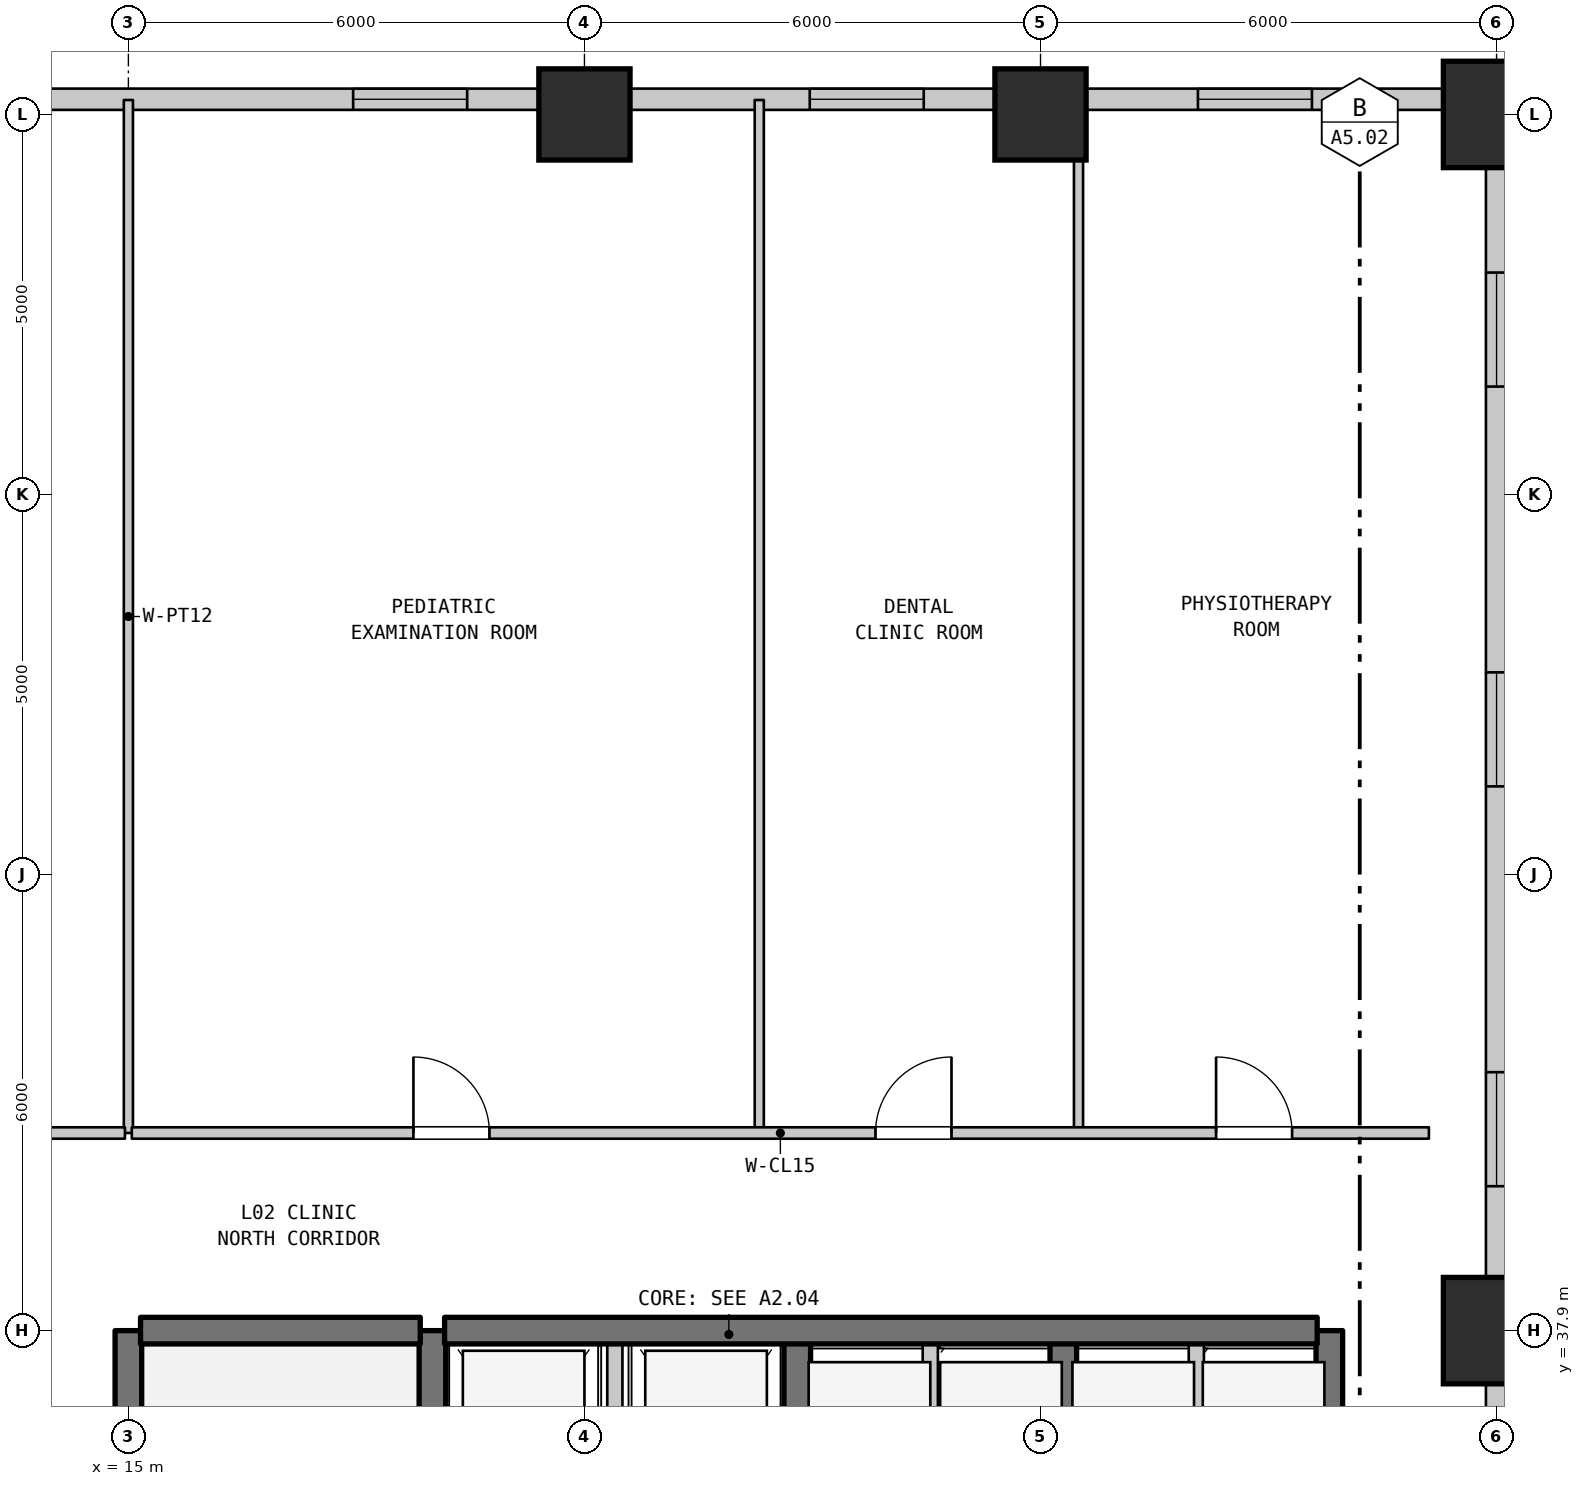
"""IFC4 building model, lengths in metres.
Left out: names, types, materials, properties, quantities, classifications, styles, units other than length and angle.
Written with IfcOpenShell. Run it as: python <this file> out.ifc"""

import sys

from ifc_helpers import new_model, si_unit, direction, frame, frame_2d, origin, origin_2d, place, context, subcontext, project, spatial, rectangle, extrude, element, fill, save


model = new_model("IFC4")
c1 = context("Model", 3, precision=1e-05, world=origin(), true_north=direction((0.0, 1.0)))
c2 = subcontext(c1, "Body", "Model", "MODEL_VIEW")
j1 = project(units=[si_unit("LENGTHUNIT", "METRE"), si_unit("PLANEANGLEUNIT", "RADIAN")], contexts=[c1])
p1 = place(None, origin())
s1 = spatial("IfcSite", under=j1, at=p1, CompositionType="ELEMENT")
p2 = place(p1, origin())
s2 = spatial("IfcBuilding", under=s1, at=p2, CompositionType="ELEMENT")
p3 = place(p2, frame((0.0, 0.0, 13.0)))
s3 = spatial("IfcBuildingStorey", under=s2, at=p3, CompositionType="ELEMENT", Elevation=13.0)
for number, where, z_axis, x_axis in (
    (1, (21.0, 53.9, 0.0), (0.0, 0.0, 1.0), (1.0, 0.0, 0.0)),
    (2, (27.0, 53.9, 0.0), (0.0, 0.0, 1.0), (1.0, 0.0, 0.0)),
):
    element("IfcColumn", number, at=place(p3, frame(where, z_axis=z_axis, x_axis=x_axis)), inside=s3, PredefinedType="PILASTER", context=c2, shape_type="SweptSolid", body=[
        extrude(rectangle(XDim=1.2, YDim=1.2, at=origin_2d()), origin(), (0.0, 0.0, 1.0), 6.0),
    ])
for number, where, z_axis, x_axis in (
    (3, (33.0, 37.9, 0.0), (0.0, 0.0, 1.0), (1.0, 0.0, 0.0)),
    (4, (33.0, 53.9, 0.0), (0.0, 0.0, 1.0), (1.0, 0.0, 0.0)),
):
    element("IfcColumn", number, at=place(p3, frame(where, z_axis=z_axis, x_axis=x_axis)), inside=s3, PredefinedType="PILASTER", context=c2, shape_type="SweptSolid", body=[
        extrude(rectangle(XDim=1.4, YDim=1.4, at=origin_2d()), origin(), (0.0, 0.0, 1.0), 6.0),
    ])
p4 = place(p3, frame((4.414, 54.1, 0.0), z_axis=(0.0, 0.0, 1.0), x_axis=(1.0, 0.0, 0.0)))
e5 = element("IfcWall", 5, at=p4, inside=s3, PredefinedType="STANDARD", context=c2, shape_type="SweptSolid", body=[
    extrude(rectangle(XDim=28.586, YDim=0.28, at=frame_2d((14.293, 0.0))), origin(), (0.0, 0.0, 1.0), 5.58),
])
p5 = place(p4, frame((2.429, 0.0, 0.95)))
e6 = element("IfcOpeningElement", 6, at=p5, cuts=e5, PredefinedType="OPENING", context=c2, shape_type="SweptSolid", body=[
    extrude(rectangle(XDim=1.5, YDim=1.8, at=frame_2d((0.75, 0.9))), frame((0.0, 0.15, 0.0), z_axis=(0.0, -1.0, 0.0), x_axis=(1.0, 0.0, 0.0)), (0.0, 0.0, 1.0), 0.3),
])
p6 = place(p4, frame((7.986, 0.0, 0.95)))
e7 = element("IfcOpeningElement", 7, at=p6, cuts=e5, PredefinedType="OPENING", context=c2, shape_type="SweptSolid", body=[
    extrude(rectangle(XDim=1.5, YDim=1.8, at=frame_2d((0.75, 0.9))), frame((0.0, 0.15, 0.0), z_axis=(0.0, -1.0, 0.0), x_axis=(1.0, 0.0, 0.0)), (0.0, 0.0, 1.0), 0.3),
])
p7 = place(p4, frame((13.543, 0.0, 0.95)))
e8 = element("IfcOpeningElement", 8, at=p7, cuts=e5, PredefinedType="OPENING", context=c2, shape_type="SweptSolid", body=[
    extrude(rectangle(XDim=1.5, YDim=1.8, at=frame_2d((0.75, 0.9))), frame((0.0, 0.15, 0.0), z_axis=(0.0, -1.0, 0.0), x_axis=(1.0, 0.0, 0.0)), (0.0, 0.0, 1.0), 0.3),
])
p8 = place(p4, frame((19.55, 0.0, 0.95)))
e9 = element("IfcOpeningElement", 9, at=p8, cuts=e5, PredefinedType="OPENING", context=c2, shape_type="SweptSolid", body=[
    extrude(rectangle(XDim=1.5, YDim=1.8, at=frame_2d((0.75, 0.9))), frame((0.0, 0.15, 0.0), z_axis=(0.0, -1.0, 0.0), x_axis=(1.0, 0.0, 0.0)), (0.0, 0.0, 1.0), 0.3),
])
p9 = place(p4, frame((24.657, 0.0, 0.95)))
e10 = element("IfcOpeningElement", 10, at=p9, cuts=e5, PredefinedType="OPENING", context=c2, shape_type="SweptSolid", body=[
    extrude(rectangle(XDim=1.5, YDim=1.8, at=frame_2d((0.75, 0.9))), frame((0.0, 0.15, 0.0), z_axis=(0.0, -1.0, 0.0), x_axis=(1.0, 0.0, 0.0)), (0.0, 0.0, 1.0), 0.3),
])
p10 = place(p3, frame((33.0, 54.1, 0.0), z_axis=(0.0, 0.0, 1.0), x_axis=(0.0, -1.0, 0.0)))
e11 = element("IfcWall", 11, at=p10, inside=s3, PredefinedType="STANDARD", context=c2, shape_type="SweptSolid", body=[
    extrude(rectangle(XDim=16.2, YDim=0.28, at=frame_2d((8.1, 0.0))), origin(), (0.0, 0.0, 1.0), 4.98),
])
p11 = place(p10, frame((2.28, 0.0, 0.95)))
e12 = element("IfcOpeningElement", 12, at=p11, cuts=e11, PredefinedType="OPENING", context=c2, shape_type="SweptSolid", body=[
    extrude(rectangle(XDim=1.5, YDim=1.8, at=frame_2d((0.75, 0.9))), frame((0.0, 0.15, 0.0), z_axis=(0.0, -1.0, 0.0), x_axis=(1.0, 0.0, 0.0)), (0.0, 0.0, 1.0), 0.3),
])
p12 = place(p10, frame((7.54, 0.0, 0.95)))
e13 = element("IfcOpeningElement", 13, at=p12, cuts=e11, PredefinedType="OPENING", context=c2, shape_type="SweptSolid", body=[
    extrude(rectangle(XDim=1.5, YDim=1.8, at=frame_2d((0.75, 0.9))), frame((0.0, 0.15, 0.0), z_axis=(0.0, -1.0, 0.0), x_axis=(1.0, 0.0, 0.0)), (0.0, 0.0, 1.0), 0.3),
])
p13 = place(p10, frame((12.8, 0.0, 0.95)))
e14 = element("IfcOpeningElement", 14, at=p13, cuts=e11, PredefinedType="OPENING", context=c2, shape_type="SweptSolid", body=[
    extrude(rectangle(XDim=1.5, YDim=1.8, at=frame_2d((0.75, 0.9))), frame((0.0, 0.15, 0.0), z_axis=(0.0, -1.0, 0.0), x_axis=(1.0, 0.0, 0.0)), (0.0, 0.0, 1.0), 0.3),
])
p14 = place(p3, frame((15.0, 31.1, 0.0), z_axis=(0.0, 0.0, 1.0), x_axis=(0.0, 1.0, 0.0)))
e15 = element("IfcWall", 15, at=p14, inside=s3, PredefinedType="SHEAR", context=c2, shape_type="SweptSolid", body=[
    extrude(rectangle(XDim=6.8, YDim=0.35, at=frame_2d((3.4, 0.0))), origin(), (0.0, 0.0, 1.0), 5.58),
])
p15 = place(p3, frame((15.0, 40.5, 0.0), z_axis=(0.0, 0.0, 1.0), x_axis=(0.0, 1.0, 0.0)))
e16 = element("IfcWall", 16, at=p15, inside=s3, PredefinedType="PARTITIONING", context=c2, shape_type="SweptSolid", body=[
    extrude(rectangle(XDim=13.59, YDim=0.12, at=frame_2d((6.795, 0.0))), origin(), (0.0, 0.0, 1.0), 5.58),
])
p16 = place(p3, frame((19.0, 35.0, 0.0), z_axis=(0.0, 0.0, 1.0), x_axis=(0.0, 1.0, 0.0)))
e17 = element("IfcWall", 17, at=p16, inside=s3, PredefinedType="SHEAR", context=c2, shape_type="SweptSolid", body=[
    extrude(rectangle(XDim=2.9, YDim=0.35, at=frame_2d((1.45, 0.0))), origin(), (0.0, 0.0, 1.0), 5.58),
])
p17 = place(p3, frame((21.4, 35.0, 0.0), z_axis=(0.0, 0.0, 1.0), x_axis=(0.0, 1.0, 0.0)))
e18 = element("IfcWall", 18, at=p17, inside=s3, PredefinedType="STANDARD", context=c2, shape_type="SweptSolid", body=[
    extrude(rectangle(XDim=2.9, YDim=0.2, at=frame_2d((1.45, 0.0))), origin(), (0.0, 0.0, 1.0), 5.58),
])
p18 = place(p3, frame((23.3, 40.5, 0.0), z_axis=(0.0, 0.0, 1.0), x_axis=(0.0, 1.0, 0.0)))
e19 = element("IfcWall", 19, at=p18, inside=s3, PredefinedType="PARTITIONING", context=c2, shape_type="SweptSolid", body=[
    extrude(rectangle(XDim=13.59, YDim=0.12, at=frame_2d((6.795, 0.0))), origin(), (0.0, 0.0, 1.0), 5.58),
])
p19 = place(p3, frame((23.8, 35.0, 0.0), z_axis=(0.0, 0.0, 1.0), x_axis=(0.0, 1.0, 0.0)))
e20 = element("IfcWall", 20, at=p19, inside=s3, PredefinedType="SHEAR", context=c2, shape_type="SweptSolid", body=[
    extrude(rectangle(XDim=2.9, YDim=0.35, at=frame_2d((1.45, 0.0))), origin(), (0.0, 0.0, 1.0), 5.58),
])
p20 = place(p3, frame((25.55, 35.0, 0.0), z_axis=(0.0, 0.0, 1.0), x_axis=(0.0, 1.0, 0.0)))
e21 = element("IfcWall", 21, at=p20, inside=s3, PredefinedType="STANDARD", context=c2, shape_type="SweptSolid", body=[
    extrude(rectangle(XDim=2.9, YDim=0.2, at=frame_2d((1.45, 0.0))), origin(), (0.0, 0.0, 1.0), 5.58),
])
p21 = place(p3, frame((27.3, 35.0, 0.0), z_axis=(0.0, 0.0, 1.0), x_axis=(0.0, 1.0, 0.0)))
e22 = element("IfcWall", 22, at=p21, inside=s3, PredefinedType="SHEAR", context=c2, shape_type="SweptSolid", body=[
    extrude(rectangle(XDim=2.9, YDim=0.35, at=frame_2d((1.45, 0.0))), origin(), (0.0, 0.0, 1.0), 5.58),
])
p22 = place(p3, frame((27.5, 40.5, 0.0), z_axis=(0.0, 0.0, 1.0), x_axis=(0.0, 1.0, 0.0)))
e23 = element("IfcWall", 23, at=p22, inside=s3, PredefinedType="PARTITIONING", context=c2, shape_type="SweptSolid", body=[
    extrude(rectangle(XDim=13.59, YDim=0.12, at=frame_2d((6.795, 0.0))), origin(), (0.0, 0.0, 1.0), 5.58),
])
p23 = place(p3, frame((29.05, 35.0, 0.0), z_axis=(0.0, 0.0, 1.0), x_axis=(0.0, 1.0, 0.0)))
e24 = element("IfcWall", 24, at=p23, inside=s3, PredefinedType="STANDARD", context=c2, shape_type="SweptSolid", body=[
    extrude(rectangle(XDim=2.9, YDim=0.2, at=frame_2d((1.45, 0.0))), origin(), (0.0, 0.0, 1.0), 5.58),
])
p24 = place(p3, frame((30.8, 35.0, 0.0), z_axis=(0.0, 0.0, 1.0), x_axis=(0.0, 1.0, 0.0)))
e25 = element("IfcWall", 25, at=p24, inside=s3, PredefinedType="SHEAR", context=c2, shape_type="SweptSolid", body=[
    extrude(rectangle(XDim=2.9, YDim=0.35, at=frame_2d((1.45, 0.0))), origin(), (0.0, 0.0, 1.0), 5.58),
])
p25 = place(p3, frame((15.16, 37.9, 0.0), z_axis=(0.0, 0.0, 1.0), x_axis=(1.0, 0.0, 0.0)))
e26 = element("IfcWall", 26, at=p25, inside=s3, PredefinedType="SHEAR", context=c2, shape_type="SweptSolid", body=[
    extrude(rectangle(XDim=3.68, YDim=0.35, at=frame_2d((1.84, 0.0))), origin(), (0.0, 0.0, 1.0), 5.58),
])
p26 = place(p3, frame((19.16, 37.9, 0.0), z_axis=(0.0, 0.0, 1.0), x_axis=(1.0, 0.0, 0.0)))
e27 = element("IfcWall", 27, at=p26, inside=s3, PredefinedType="SHEAR", context=c2, shape_type="SweptSolid", body=[
    extrude(rectangle(XDim=11.48, YDim=0.35, at=frame_2d((5.74, 0.0))), origin(), (0.0, 0.0, 1.0), 5.58),
])
p27 = place(p3, frame((12.26, 40.5, 0.0), z_axis=(0.0, 0.0, 1.0), x_axis=(1.0, 0.0, 0.0)))
e28 = element("IfcWall", 28, at=p27, inside=s3, PredefinedType="STANDARD", context=c2, shape_type="SweptSolid", body=[
    extrude(rectangle(XDim=2.695, YDim=0.15, at=frame_2d((1.348, 0.0))), origin(), (0.0, 0.0, 1.0), 5.58),
])
p28 = place(p3, frame((15.045, 40.5, 0.0), z_axis=(0.0, 0.0, 1.0), x_axis=(1.0, 0.0, 0.0)))
e29 = element("IfcWall", 29, at=p28, inside=s3, PredefinedType="STANDARD", context=c2, shape_type="SweptSolid", body=[
    extrude(rectangle(XDim=17.065, YDim=0.15, at=frame_2d((8.533, 0.0))), origin(), (0.0, 0.0, 1.0), 5.58),
])
p29 = place(p28, frame((3.705, 0.0, 0.0)))
e30 = element("IfcOpeningElement", 30, at=p29, cuts=e29, PredefinedType="OPENING", context=c2, shape_type="SweptSolid", body=[
    extrude(rectangle(XDim=1.0, YDim=2.15, at=frame_2d((0.5, 1.075))), frame((0.0, 0.085, 0.0), z_axis=(0.0, -1.0, 0.0), x_axis=(1.0, 0.0, 0.0)), (0.0, 0.0, 1.0), 0.17),
])
p30 = place(p28, frame((9.784, 0.0, 0.0)))
e31 = element("IfcOpeningElement", 31, at=p30, cuts=e29, PredefinedType="OPENING", context=c2, shape_type="SweptSolid", body=[
    extrude(rectangle(XDim=1.0, YDim=2.15, at=frame_2d((0.5, 1.075))), frame((0.0, 0.085, 0.0), z_axis=(0.0, -1.0, 0.0), x_axis=(1.0, 0.0, 0.0)), (0.0, 0.0, 1.0), 0.17),
])
p31 = place(p28, frame((14.265, 0.0, 0.0)))
e32 = element("IfcOpeningElement", 32, at=p31, cuts=e29, PredefinedType="OPENING", context=c2, shape_type="SweptSolid", body=[
    extrude(rectangle(XDim=1.0, YDim=2.15, at=frame_2d((0.5, 1.075))), frame((0.0, 0.085, 0.0), z_axis=(0.0, -1.0, 0.0), x_axis=(1.0, 0.0, 0.0)), (0.0, 0.0, 1.0), 0.17),
])
p32 = place(p3, frame((33.0, 37.9, 0.0), z_axis=(0.0, 0.0, 1.0), x_axis=(0.0, -1.0, 0.0)))
e33 = element("IfcWall", 33, at=p32, inside=s3, PredefinedType="STANDARD", context=c2, shape_type="SweptSolid", body=[
    extrude(rectangle(XDim=37.2, YDim=0.28, at=frame_2d((18.6, 0.0))), origin(), (0.0, 0.0, 1.0), 5.08),
])
p33 = place(p32, frame((1.86, 0.0, 0.95)))
e34 = element("IfcOpeningElement", 34, at=p33, cuts=e33, PredefinedType="OPENING", context=c2, shape_type="SweptSolid", body=[
    extrude(rectangle(XDim=1.5, YDim=1.8, at=frame_2d((0.75, 0.9))), frame((0.0, 0.15, 0.0), z_axis=(0.0, -1.0, 0.0), x_axis=(1.0, 0.0, 0.0)), (0.0, 0.0, 1.0), 0.3),
])
p34 = place(p32, frame((7.12, 0.0, 0.95)))
e35 = element("IfcOpeningElement", 35, at=p34, cuts=e33, PredefinedType="OPENING", context=c2, shape_type="SweptSolid", body=[
    extrude(rectangle(XDim=1.5, YDim=1.8, at=frame_2d((0.75, 0.9))), frame((0.0, 0.15, 0.0), z_axis=(0.0, -1.0, 0.0), x_axis=(1.0, 0.0, 0.0)), (0.0, 0.0, 1.0), 0.3),
])
p35 = place(p32, frame((12.38, 0.0, 0.95)))
e36 = element("IfcOpeningElement", 36, at=p35, cuts=e33, PredefinedType="OPENING", context=c2, shape_type="SweptSolid", body=[
    extrude(rectangle(XDim=1.5, YDim=1.8, at=frame_2d((0.75, 0.9))), frame((0.0, 0.15, 0.0), z_axis=(0.0, -1.0, 0.0), x_axis=(1.0, 0.0, 0.0)), (0.0, 0.0, 1.0), 0.3),
])
p36 = place(p32, frame((17.19, 0.0, 0.95)))
e37 = element("IfcOpeningElement", 37, at=p36, cuts=e33, PredefinedType="OPENING", context=c2, shape_type="SweptSolid", body=[
    extrude(rectangle(XDim=1.5, YDim=1.8, at=frame_2d((0.75, 0.9))), frame((0.0, 0.15, 0.0), z_axis=(0.0, -1.0, 0.0), x_axis=(1.0, 0.0, 0.0)), (0.0, 0.0, 1.0), 0.3),
])
p37 = place(p32, frame((22.45, 0.0, 0.95)))
e38 = element("IfcOpeningElement", 38, at=p37, cuts=e33, PredefinedType="OPENING", context=c2, shape_type="SweptSolid", body=[
    extrude(rectangle(XDim=1.5, YDim=1.8, at=frame_2d((0.75, 0.9))), frame((0.0, 0.15, 0.0), z_axis=(0.0, -1.0, 0.0), x_axis=(1.0, 0.0, 0.0)), (0.0, 0.0, 1.0), 0.3),
])
p38 = place(p32, frame((28.16, 0.0, 0.95)))
e39 = element("IfcOpeningElement", 39, at=p38, cuts=e33, PredefinedType="OPENING", context=c2, shape_type="SweptSolid", body=[
    extrude(rectangle(XDim=1.5, YDim=1.8, at=frame_2d((0.75, 0.9))), frame((0.0, 0.15, 0.0), z_axis=(0.0, -1.0, 0.0), x_axis=(1.0, 0.0, 0.0)), (0.0, 0.0, 1.0), 0.3),
])
p39 = place(p32, frame((33.42, 0.0, 0.95)))
e40 = element("IfcOpeningElement", 40, at=p39, cuts=e33, PredefinedType="OPENING", context=c2, shape_type="SweptSolid", body=[
    extrude(rectangle(XDim=1.5, YDim=1.8, at=frame_2d((0.75, 0.9))), frame((0.0, 0.15, 0.0), z_axis=(0.0, -1.0, 0.0), x_axis=(1.0, 0.0, 0.0)), (0.0, 0.0, 1.0), 0.3),
])
p40 = place(p7, origin())
e41 = element("IfcWindow", 41, at=p40, inside=s3, PartitioningType="SINGLE_PANEL", PredefinedType="WINDOW", context=c2, shape_type="SweptSolid", body=[
    extrude(rectangle(XDim=1.5, YDim=1.8, at=frame_2d((0.75, 0.9))), frame((0.0, 0.03, 0.0), z_axis=(0.0, -1.0, 0.0), x_axis=(1.0, 0.0, 0.0)), (0.0, 0.0, 1.0), 0.06),
])
fill(e8, e41)
p41 = place(p8, origin())
e42 = element("IfcWindow", 42, at=p41, inside=s3, PartitioningType="SINGLE_PANEL", PredefinedType="WINDOW", context=c2, shape_type="SweptSolid", body=[
    extrude(rectangle(XDim=1.5, YDim=1.8, at=frame_2d((0.75, 0.9))), frame((0.0, 0.03, 0.0), z_axis=(0.0, -1.0, 0.0), x_axis=(1.0, 0.0, 0.0)), (0.0, 0.0, 1.0), 0.06),
])
fill(e9, e42)
p42 = place(p9, origin())
e43 = element("IfcWindow", 43, at=p42, inside=s3, PartitioningType="SINGLE_PANEL", PredefinedType="WINDOW", context=c2, shape_type="SweptSolid", body=[
    extrude(rectangle(XDim=1.5, YDim=1.8, at=frame_2d((0.75, 0.9))), frame((0.0, 0.03, 0.0), z_axis=(0.0, -1.0, 0.0), x_axis=(1.0, 0.0, 0.0)), (0.0, 0.0, 1.0), 0.06),
])
fill(e10, e43)
p43 = place(p11, origin())
e44 = element("IfcWindow", 44, at=p43, inside=s3, PartitioningType="SINGLE_PANEL", PredefinedType="WINDOW", context=c2, shape_type="SweptSolid", body=[
    extrude(rectangle(XDim=1.5, YDim=1.8, at=frame_2d((0.75, 0.9))), frame((0.0, 0.03, 0.0), z_axis=(0.0, -1.0, 0.0), x_axis=(1.0, 0.0, 0.0)), (0.0, 0.0, 1.0), 0.06),
])
fill(e12, e44)
p44 = place(p12, origin())
e45 = element("IfcWindow", 45, at=p44, inside=s3, PartitioningType="SINGLE_PANEL", PredefinedType="WINDOW", context=c2, shape_type="SweptSolid", body=[
    extrude(rectangle(XDim=1.5, YDim=1.8, at=frame_2d((0.75, 0.9))), frame((0.0, 0.03, 0.0), z_axis=(0.0, -1.0, 0.0), x_axis=(1.0, 0.0, 0.0)), (0.0, 0.0, 1.0), 0.06),
])
fill(e13, e45)
p45 = place(p13, origin())
e46 = element("IfcWindow", 46, at=p45, inside=s3, PartitioningType="SINGLE_PANEL", PredefinedType="WINDOW", context=c2, shape_type="SweptSolid", body=[
    extrude(rectangle(XDim=1.5, YDim=1.8, at=frame_2d((0.75, 0.9))), frame((0.0, 0.03, 0.0), z_axis=(0.0, -1.0, 0.0), x_axis=(1.0, 0.0, 0.0)), (0.0, 0.0, 1.0), 0.06),
])
fill(e14, e46)
p46 = place(p29, origin())
e47 = element("IfcDoor", 47, at=p46, inside=s3, OperationType="SINGLE_SWING_LEFT", PredefinedType="DOOR", context=c2, shape_type="SweptSolid", body=[
    extrude(rectangle(XDim=1.0, YDim=2.15, at=frame_2d((0.5, 1.075))), frame((0.0, 0.025, 0.0), z_axis=(0.0, -1.0, 0.0), x_axis=(1.0, 0.0, 0.0)), (0.0, 0.0, 1.0), 0.05),
])
fill(e30, e47)
p47 = place(p30, origin())
e48 = element("IfcDoor", 48, at=p47, inside=s3, OperationType="SINGLE_SWING_RIGHT", PredefinedType="DOOR", context=c2, shape_type="SweptSolid", body=[
    extrude(rectangle(XDim=1.0, YDim=2.15, at=frame_2d((0.5, 1.075))), frame((0.0, 0.025, 0.0), z_axis=(0.0, -1.0, 0.0), x_axis=(1.0, 0.0, 0.0)), (0.0, 0.0, 1.0), 0.05),
])
fill(e31, e48)
p48 = place(p31, origin())
e49 = element("IfcDoor", 49, at=p48, inside=s3, OperationType="SINGLE_SWING_LEFT", PredefinedType="DOOR", context=c2, shape_type="SweptSolid", body=[
    extrude(rectangle(XDim=1.0, YDim=2.15, at=frame_2d((0.5, 1.075))), frame((0.0, 0.025, 0.0), z_axis=(0.0, -1.0, 0.0), x_axis=(1.0, 0.0, 0.0)), (0.0, 0.0, 1.0), 0.05),
])
fill(e32, e49)
save(model, sys.argv[1])
